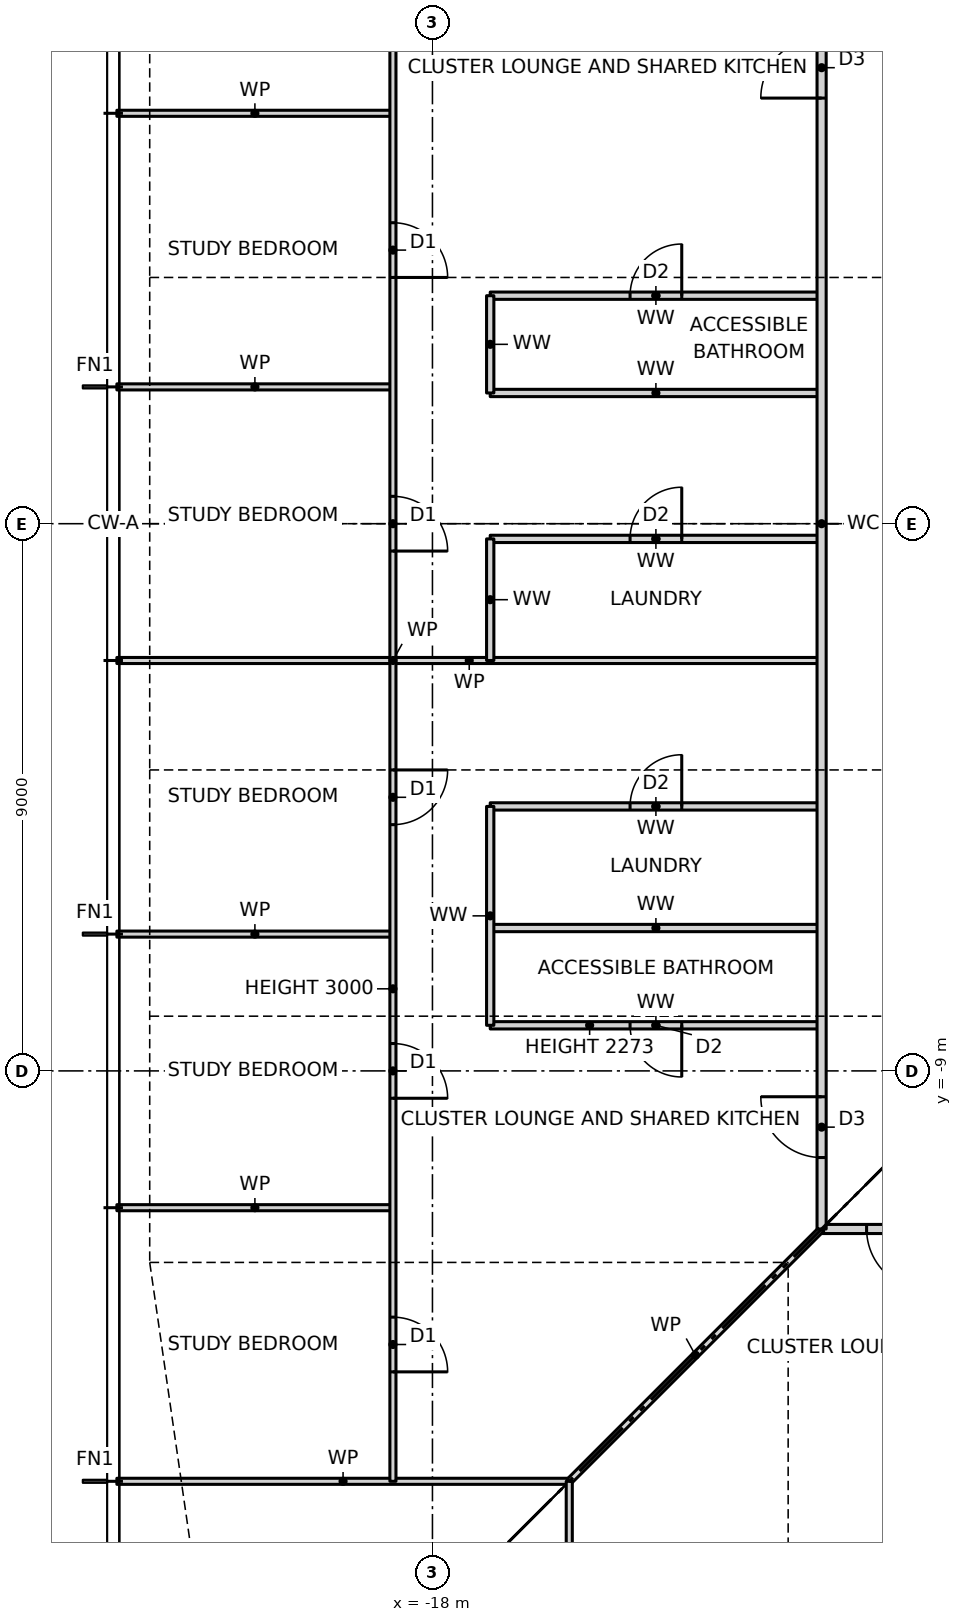
"""IFC4 building model, lengths in metres.
Left out: names, types, materials, properties, quantities, classifications, styles, units other than length and angle.
Written with IfcOpenShell. Run it as: python <this file> out.ifc"""

import sys

from ifc_helpers import new_model, si_unit, direction, frame, frame_2d, origin, place, context, subcontext, project, spatial, rectangle, extrude, element, fill, save


model = new_model("IFC4")
c1 = context("Model", 3, precision=1e-05, world=origin(), true_north=direction((0.0, 1.0)))
c2 = subcontext(c1, "Body", "Model", "MODEL_VIEW")
j1 = project(units=[si_unit("LENGTHUNIT", "METRE"), si_unit("PLANEANGLEUNIT", "RADIAN")], contexts=[c1])
p1 = place(None, origin())
s1 = spatial("IfcSite", under=j1, at=p1, CompositionType="ELEMENT")
p2 = place(p1, origin())
s2 = spatial("IfcBuilding", under=s1, at=p2, CompositionType="ELEMENT")
p3 = place(p2, frame((0.0, 0.0, 71.0)))
s3 = spatial("IfcBuildingStorey", under=s2, at=p3, CompositionType="ELEMENT", Elevation=71.0)
p4 = place(p3, frame((-23.19, -15.75, 0.0), z_axis=(0.0, 0.0, 1.0), x_axis=(1.0, 0.0, 0.0)))
e1 = element("IfcWall", 1, at=p4, inside=s3, PredefinedType="PARTITIONING", context=c2, shape_type="SweptSolid", body=[
    extrude(rectangle(XDim=7.44, YDim=0.1, at=frame_2d((3.72, 0.0))), origin(), (0.0, 0.0, 1.0), 3.2),
])
p5 = place(p3, frame((-11.6, -11.6, 0.0), z_axis=(0.0, 0.0, 1.0), x_axis=(1.0, 0.0, 0.0)))
e2 = element("IfcWall", 2, at=p5, inside=s3, PredefinedType="PARTITIONING", context=c2, shape_type="SweptSolid", body=[
    extrude(rectangle(XDim=24.2, YDim=0.15, at=frame_2d((12.1, 0.0))), origin(), (0.0, 0.0, 1.0), 3.2),
])
p6 = place(p5, frame((0.74, 0.0, 0.0)))
e3 = element("IfcOpeningElement", 3, at=p6, cuts=e2, PredefinedType="OPENING", context=c2, shape_type="SweptSolid", body=[
    extrude(rectangle(XDim=1.0, YDim=2.1, at=frame_2d((0.5, 1.05))), frame((0.0, 0.085, 0.0), z_axis=(0.0, -1.0, 0.0), x_axis=(1.0, 0.0, 0.0)), (0.0, 0.0, 1.0), 0.17),
])
p7 = place(p5, frame((21.025, 0.0, 0.0)))
e4 = element("IfcOpeningElement", 4, at=p7, cuts=e2, PredefinedType="OPENING", context=c2, shape_type="SweptSolid", body=[
    extrude(rectangle(XDim=1.0, YDim=2.1, at=frame_2d((0.5, 1.05))), frame((0.0, 0.085, 0.0), z_axis=(0.0, -1.0, 0.0), x_axis=(1.0, 0.0, 0.0)), (0.0, 0.0, 1.0), 0.17),
])
p8 = place(p3, frame((-23.19, -11.25, 0.0), z_axis=(0.0, 0.0, 1.0), x_axis=(1.0, 0.0, 0.0)))
e5 = element("IfcWall", 5, at=p8, inside=s3, PredefinedType="PARTITIONING", context=c2, shape_type="SweptSolid", body=[
    extrude(rectangle(XDim=4.54, YDim=0.1, at=frame_2d((2.27, 0.0))), origin(), (0.0, 0.0, 1.0), 3.2),
])
p9 = place(p3, frame((-17.05, -8.25, 0.0), z_axis=(0.0, 0.0, 1.0), x_axis=(1.0, 0.0, 0.0)))
e6 = element("IfcWall", 6, at=p9, inside=s3, PredefinedType="PARTITIONING", context=c2, shape_type="SweptSolid", body=[
    extrude(rectangle(XDim=5.45, YDim=0.12, at=frame_2d((2.725, 0.0))), origin(), (0.0, 0.0, 1.0), 2.273),
])
p10 = place(p9, frame((2.3, 0.0, 0.0)))
e7 = element("IfcOpeningElement", 7, at=p10, cuts=e6, PredefinedType="OPENING", context=c2, shape_type="SweptSolid", body=[
    extrude(rectangle(XDim=0.85, YDim=2.1, at=frame_2d((0.425, 1.05))), frame((0.0, 0.07, 0.0), z_axis=(0.0, -1.0, 0.0), x_axis=(1.0, 0.0, 0.0)), (0.0, 0.0, 1.0), 0.14),
])
p11 = place(p3, frame((-23.19, -6.75, 0.0), z_axis=(0.0, 0.0, 1.0), x_axis=(1.0, 0.0, 0.0)))
e8 = element("IfcWall", 8, at=p11, inside=s3, PredefinedType="PARTITIONING", context=c2, shape_type="SweptSolid", body=[
    extrude(rectangle(XDim=4.54, YDim=0.1, at=frame_2d((2.27, 0.0))), origin(), (0.0, 0.0, 1.0), 3.2),
])
p12 = place(p3, frame((-17.05, -6.65, 0.0), z_axis=(0.0, 0.0, 1.0), x_axis=(1.0, 0.0, 0.0)))
e9 = element("IfcWall", 9, at=p12, inside=s3, PredefinedType="PARTITIONING", context=c2, shape_type="SweptSolid", body=[
    extrude(rectangle(XDim=5.45, YDim=0.12, at=frame_2d((2.725, 0.0))), origin(), (0.0, 0.0, 1.0), 3.2),
])
p13 = place(p3, frame((-17.05, -4.65, 0.0), z_axis=(0.0, 0.0, 1.0), x_axis=(1.0, 0.0, 0.0)))
e10 = element("IfcWall", 10, at=p13, inside=s3, PredefinedType="PARTITIONING", context=c2, shape_type="SweptSolid", body=[
    extrude(rectangle(XDim=5.45, YDim=0.12, at=frame_2d((2.725, 0.0))), origin(), (0.0, 0.0, 1.0), 3.2),
])
p14 = place(p13, frame((2.3, 0.0, 0.0)))
e11 = element("IfcOpeningElement", 11, at=p14, cuts=e10, PredefinedType="OPENING", context=c2, shape_type="SweptSolid", body=[
    extrude(rectangle(XDim=0.85, YDim=2.1, at=frame_2d((0.425, 1.05))), frame((0.0, 0.07, 0.0), z_axis=(0.0, -1.0, 0.0), x_axis=(1.0, 0.0, 0.0)), (0.0, 0.0, 1.0), 0.14),
])
p15 = place(p3, frame((-23.19, -2.25, 0.0), z_axis=(0.0, 0.0, 1.0), x_axis=(1.0, 0.0, 0.0)))
e12 = element("IfcWall", 12, at=p15, inside=s3, PredefinedType="PARTITIONING", context=c2, shape_type="SweptSolid", body=[
    extrude(rectangle(XDim=11.59, YDim=0.1, at=frame_2d((5.795, 0.0))), origin(), (0.0, 0.0, 1.0), 3.2),
])
p16 = place(p3, frame((-17.05, -0.25, 0.0), z_axis=(0.0, 0.0, 1.0), x_axis=(1.0, 0.0, 0.0)))
e13 = element("IfcWall", 13, at=p16, inside=s3, PredefinedType="PARTITIONING", context=c2, shape_type="SweptSolid", body=[
    extrude(rectangle(XDim=5.45, YDim=0.12, at=frame_2d((2.725, 0.0))), origin(), (0.0, 0.0, 1.0), 3.2),
])
p17 = place(p16, frame((2.3, 0.0, 0.0)))
e14 = element("IfcOpeningElement", 14, at=p17, cuts=e13, PredefinedType="OPENING", context=c2, shape_type="SweptSolid", body=[
    extrude(rectangle(XDim=0.85, YDim=2.1, at=frame_2d((0.425, 1.05))), frame((0.0, 0.07, 0.0), z_axis=(0.0, -1.0, 0.0), x_axis=(1.0, 0.0, 0.0)), (0.0, 0.0, 1.0), 0.14),
])
p18 = place(p3, frame((-17.05, 2.15, 0.0), z_axis=(0.0, 0.0, 1.0), x_axis=(1.0, 0.0, 0.0)))
e15 = element("IfcWall", 15, at=p18, inside=s3, PredefinedType="PARTITIONING", context=c2, shape_type="SweptSolid", body=[
    extrude(rectangle(XDim=5.45, YDim=0.12, at=frame_2d((2.725, 0.0))), origin(), (0.0, 0.0, 1.0), 3.2),
])
p19 = place(p3, frame((-23.19, 2.25, 0.0), z_axis=(0.0, 0.0, 1.0), x_axis=(1.0, 0.0, 0.0)))
e16 = element("IfcWall", 16, at=p19, inside=s3, PredefinedType="PARTITIONING", context=c2, shape_type="SweptSolid", body=[
    extrude(rectangle(XDim=4.54, YDim=0.1, at=frame_2d((2.27, 0.0))), origin(), (0.0, 0.0, 1.0), 3.2),
])
p20 = place(p3, frame((-17.05, 3.75, 0.0), z_axis=(0.0, 0.0, 1.0), x_axis=(1.0, 0.0, 0.0)))
e17 = element("IfcWall", 17, at=p20, inside=s3, PredefinedType="PARTITIONING", context=c2, shape_type="SweptSolid", body=[
    extrude(rectangle(XDim=5.45, YDim=0.12, at=frame_2d((2.725, 0.0))), origin(), (0.0, 0.0, 1.0), 3.2),
])
p21 = place(p20, frame((2.3, 0.0, 0.0)))
e18 = element("IfcOpeningElement", 18, at=p21, cuts=e17, PredefinedType="OPENING", context=c2, shape_type="SweptSolid", body=[
    extrude(rectangle(XDim=0.85, YDim=2.1, at=frame_2d((0.425, 1.05))), frame((0.0, 0.07, 0.0), z_axis=(0.0, -1.0, 0.0), x_axis=(1.0, 0.0, 0.0)), (0.0, 0.0, 1.0), 0.14),
])
p22 = place(p3, frame((-23.19, 6.75, 0.0), z_axis=(0.0, 0.0, 1.0), x_axis=(1.0, 0.0, 0.0)))
e19 = element("IfcWall", 19, at=p22, inside=s3, PredefinedType="PARTITIONING", context=c2, shape_type="SweptSolid", body=[
    extrude(rectangle(XDim=4.54, YDim=0.1, at=frame_2d((2.27, 0.0))), origin(), (0.0, 0.0, 1.0), 3.2),
])
p23 = place(p3, frame((-15.75, -15.75, 0.0), z_axis=(0.0, 0.0, 1.0), x_axis=(0.707106781187, 0.707106781187, 0.0)))
e20 = element("IfcWall", 20, at=p23, inside=s3, PredefinedType="PARTITIONING", context=c2, shape_type="SweptSolid", body=[
    extrude(rectangle(XDim=5.869, YDim=0.1, at=frame_2d((2.935, 0.0))), origin(), (0.0, 0.0, 1.0), 3.2),
])
p24 = place(p3, frame((-11.6, -11.6, 0.0), z_axis=(0.0, 0.0, 1.0), x_axis=(0.0, 1.0, 0.0)))
e21 = element("IfcWall", 21, at=p24, inside=s3, PredefinedType="PARTITIONING", context=c2, shape_type="SweptSolid", body=[
    extrude(rectangle(XDim=23.2, YDim=0.15, at=frame_2d((11.6, 0.0))), origin(), (0.0, 0.0, 1.0), 3.2),
])
p25 = place(p24, frame((18.6, 0.0, 0.0)))
e22 = element("IfcOpeningElement", 22, at=p25, cuts=e21, PredefinedType="OPENING", context=c2, shape_type="SweptSolid", body=[
    extrude(rectangle(XDim=1.0, YDim=2.1, at=frame_2d((0.5, 1.05))), frame((0.0, 0.085, 0.0), z_axis=(0.0, -1.0, 0.0), x_axis=(1.0, 0.0, 0.0)), (0.0, 0.0, 1.0), 0.17),
])
p26 = place(p24, frame((1.175, 0.0, 0.0)))
e23 = element("IfcOpeningElement", 23, at=p26, cuts=e21, PredefinedType="OPENING", context=c2, shape_type="SweptSolid", body=[
    extrude(rectangle(XDim=1.0, YDim=2.1, at=frame_2d((0.5, 1.05))), frame((0.0, 0.085, 0.0), z_axis=(0.0, -1.0, 0.0), x_axis=(1.0, 0.0, 0.0)), (0.0, 0.0, 1.0), 0.17),
])
p27 = place(p3, frame((-15.75, -23.19, 0.0), z_axis=(0.0, 0.0, 1.0), x_axis=(0.0, 1.0, 0.0)))
e24 = element("IfcWall", 24, at=p27, inside=s3, PredefinedType="PARTITIONING", context=c2, shape_type="SweptSolid", body=[
    extrude(rectangle(XDim=7.44, YDim=0.1, at=frame_2d((3.72, 0.0))), origin(), (0.0, 0.0, 1.0), 3.2),
])
p28 = place(p27, frame((4.915, 0.0, 0.0)))
e25 = element("IfcOpeningElement", 25, at=p28, cuts=e24, PredefinedType="OPENING", context=c2, shape_type="SweptSolid", body=[
    extrude(rectangle(XDim=0.85, YDim=2.1, at=frame_2d((0.425, 1.05))), frame((0.0, 0.06, 0.0), z_axis=(0.0, -1.0, 0.0), x_axis=(1.0, 0.0, 0.0)), (0.0, 0.0, 1.0), 0.12),
])
p29 = place(p3, frame((-17.05, -8.25, 0.0), z_axis=(0.0, 0.0, 1.0), x_axis=(0.0, 1.0, 0.0)))
e26 = element("IfcWall", 26, at=p29, inside=s3, PredefinedType="PARTITIONING", context=c2, shape_type="SweptSolid", body=[
    extrude(rectangle(XDim=3.6, YDim=0.12, at=frame_2d((1.8, 0.0))), origin(), (0.0, 0.0, 1.0), 3.2),
])
p30 = place(p3, frame((-17.05, -2.25, 0.0), z_axis=(0.0, 0.0, 1.0), x_axis=(0.0, 1.0, 0.0)))
e27 = element("IfcWall", 27, at=p30, inside=s3, PredefinedType="PARTITIONING", context=c2, shape_type="SweptSolid", body=[
    extrude(rectangle(XDim=2.0, YDim=0.12, at=frame_2d((1.0, 0.0))), origin(), (0.0, 0.0, 1.0), 3.2),
])
p31 = place(p3, frame((-17.05, 2.15, 0.0), z_axis=(0.0, 0.0, 1.0), x_axis=(0.0, 1.0, 0.0)))
e28 = element("IfcWall", 28, at=p31, inside=s3, PredefinedType="PARTITIONING", context=c2, shape_type="SweptSolid", body=[
    extrude(rectangle(XDim=1.6, YDim=0.12, at=frame_2d((0.8, 0.0))), origin(), (0.0, 0.0, 1.0), 3.2),
])
p32 = place(p3, frame((-18.65, -15.75, 0.0), z_axis=(0.0, 0.0, 1.0), x_axis=(0.0, 1.0, 0.0)))
e29 = element("IfcWall", 29, at=p32, inside=s3, PredefinedType="PARTITIONING", context=c2, shape_type="SweptSolid", body=[
    extrude(rectangle(XDim=27.0, YDim=0.1, at=frame_2d((13.5, 0.0))), origin(), (0.0, 0.0, 1.0), 3.0),
])
p33 = place(p32, frame((24.3, 0.0, 0.0)))
e30 = element("IfcOpeningElement", 30, at=p33, cuts=e29, PredefinedType="OPENING", context=c2, shape_type="SweptSolid", body=[
    extrude(rectangle(XDim=0.9, YDim=2.1, at=frame_2d((0.45, 1.05))), frame((0.0, 0.06, 0.0), z_axis=(0.0, -1.0, 0.0), x_axis=(1.0, 0.0, 0.0)), (0.0, 0.0, 1.0), 0.12),
])
p34 = place(p32, frame((19.8, 0.0, 0.0)))
e31 = element("IfcOpeningElement", 31, at=p34, cuts=e29, PredefinedType="OPENING", context=c2, shape_type="SweptSolid", body=[
    extrude(rectangle(XDim=0.9, YDim=2.1, at=frame_2d((0.45, 1.05))), frame((0.0, 0.06, 0.0), z_axis=(0.0, -1.0, 0.0), x_axis=(1.0, 0.0, 0.0)), (0.0, 0.0, 1.0), 0.12),
])
p35 = place(p32, frame((15.3, 0.0, 0.0)))
e32 = element("IfcOpeningElement", 32, at=p35, cuts=e29, PredefinedType="OPENING", context=c2, shape_type="SweptSolid", body=[
    extrude(rectangle(XDim=0.9, YDim=2.1, at=frame_2d((0.45, 1.05))), frame((0.0, 0.06, 0.0), z_axis=(0.0, -1.0, 0.0), x_axis=(1.0, 0.0, 0.0)), (0.0, 0.0, 1.0), 0.12),
])
p36 = place(p32, frame((10.8, 0.0, 0.0)))
e33 = element("IfcOpeningElement", 33, at=p36, cuts=e29, PredefinedType="OPENING", context=c2, shape_type="SweptSolid", body=[
    extrude(rectangle(XDim=0.9, YDim=2.1, at=frame_2d((0.45, 1.05))), frame((0.0, 0.06, 0.0), z_axis=(0.0, -1.0, 0.0), x_axis=(1.0, 0.0, 0.0)), (0.0, 0.0, 1.0), 0.12),
])
p37 = place(p32, frame((6.3, 0.0, 0.0)))
e34 = element("IfcOpeningElement", 34, at=p37, cuts=e29, PredefinedType="OPENING", context=c2, shape_type="SweptSolid", body=[
    extrude(rectangle(XDim=0.9, YDim=2.1, at=frame_2d((0.45, 1.05))), frame((0.0, 0.06, 0.0), z_axis=(0.0, -1.0, 0.0), x_axis=(1.0, 0.0, 0.0)), (0.0, 0.0, 1.0), 0.12),
])
p38 = place(p32, frame((1.8, 0.0, 0.0)))
e35 = element("IfcOpeningElement", 35, at=p38, cuts=e29, PredefinedType="OPENING", context=c2, shape_type="SweptSolid", body=[
    extrude(rectangle(XDim=0.9, YDim=2.1, at=frame_2d((0.45, 1.05))), frame((0.0, 0.06, 0.0), z_axis=(0.0, -1.0, 0.0), x_axis=(1.0, 0.0, 0.0)), (0.0, 0.0, 1.0), 0.12),
])
p39 = place(p6, frame((1.0, 0.0, 0.0), z_axis=(0.0, 0.0, 1.0), x_axis=(-1.0, 0.0, 0.0)))
e36 = element("IfcDoor", 36, at=p39, inside=s3, OperationType="SINGLE_SWING_LEFT", PredefinedType="DOOR", context=c2, shape_type="SweptSolid", body=[
    extrude(rectangle(XDim=1.0, YDim=2.1, at=frame_2d((0.5, 1.05))), frame((0.0, 0.025, 0.0), z_axis=(0.0, -1.0, 0.0), x_axis=(1.0, 0.0, 0.0)), (0.0, 0.0, 1.0), 0.05),
])
fill(e3, e36)
p40 = place(p34, frame((0.9, 0.0, 0.0), z_axis=(0.0, 0.0, 1.0), x_axis=(-1.0, 0.0, 0.0)))
e37 = element("IfcDoor", 37, at=p40, inside=s3, OperationType="SINGLE_SWING_RIGHT", PredefinedType="DOOR", context=c2, shape_type="SweptSolid", body=[
    extrude(rectangle(XDim=0.9, YDim=2.1, at=frame_2d((0.45, 1.05))), frame((0.0, 0.025, 0.0), z_axis=(0.0, -1.0, 0.0), x_axis=(1.0, 0.0, 0.0)), (0.0, 0.0, 1.0), 0.05),
])
fill(e31, e37)
p41 = place(p35, frame((0.9, 0.0, 0.0), z_axis=(0.0, 0.0, 1.0), x_axis=(-1.0, 0.0, 0.0)))
e38 = element("IfcDoor", 38, at=p41, inside=s3, OperationType="SINGLE_SWING_RIGHT", PredefinedType="DOOR", context=c2, shape_type="SweptSolid", body=[
    extrude(rectangle(XDim=0.9, YDim=2.1, at=frame_2d((0.45, 1.05))), frame((0.0, 0.025, 0.0), z_axis=(0.0, -1.0, 0.0), x_axis=(1.0, 0.0, 0.0)), (0.0, 0.0, 1.0), 0.05),
])
fill(e32, e38)
p42 = place(p25, origin())
e39 = element("IfcDoor", 39, at=p42, inside=s3, OperationType="SINGLE_SWING_LEFT", PredefinedType="DOOR", context=c2, shape_type="SweptSolid", body=[
    extrude(rectangle(XDim=1.0, YDim=2.1, at=frame_2d((0.5, 1.05))), frame((0.0, 0.025, 0.0), z_axis=(0.0, -1.0, 0.0), x_axis=(1.0, 0.0, 0.0)), (0.0, 0.0, 1.0), 0.05),
])
fill(e22, e39)
p43 = place(p21, origin())
e40 = element("IfcDoor", 40, at=p43, inside=s3, OperationType="SINGLE_SWING_RIGHT", PredefinedType="DOOR", context=c2, shape_type="SweptSolid", body=[
    extrude(rectangle(XDim=0.85, YDim=2.1, at=frame_2d((0.425, 1.05))), frame((0.0, 0.025, 0.0), z_axis=(0.0, -1.0, 0.0), x_axis=(1.0, 0.0, 0.0)), (0.0, 0.0, 1.0), 0.05),
])
fill(e18, e40)
p44 = place(p17, origin())
e41 = element("IfcDoor", 41, at=p44, inside=s3, OperationType="SINGLE_SWING_RIGHT", PredefinedType="DOOR", context=c2, shape_type="SweptSolid", body=[
    extrude(rectangle(XDim=0.85, YDim=2.1, at=frame_2d((0.425, 1.05))), frame((0.0, 0.025, 0.0), z_axis=(0.0, -1.0, 0.0), x_axis=(1.0, 0.0, 0.0)), (0.0, 0.0, 1.0), 0.05),
])
fill(e14, e41)
p45 = place(p36, frame((0.9, 0.0, 0.0), z_axis=(0.0, 0.0, 1.0), x_axis=(-1.0, 0.0, 0.0)))
e42 = element("IfcDoor", 42, at=p45, inside=s3, OperationType="SINGLE_SWING_LEFT", PredefinedType="DOOR", context=c2, shape_type="SweptSolid", body=[
    extrude(rectangle(XDim=0.9, YDim=2.1, at=frame_2d((0.45, 1.05))), frame((0.0, 0.025, 0.0), z_axis=(0.0, -1.0, 0.0), x_axis=(1.0, 0.0, 0.0)), (0.0, 0.0, 1.0), 0.05),
])
fill(e33, e42)
p46 = place(p37, frame((0.9, 0.0, 0.0), z_axis=(0.0, 0.0, 1.0), x_axis=(-1.0, 0.0, 0.0)))
e43 = element("IfcDoor", 43, at=p46, inside=s3, OperationType="SINGLE_SWING_RIGHT", PredefinedType="DOOR", context=c2, shape_type="SweptSolid", body=[
    extrude(rectangle(XDim=0.9, YDim=2.1, at=frame_2d((0.45, 1.05))), frame((0.0, 0.025, 0.0), z_axis=(0.0, -1.0, 0.0), x_axis=(1.0, 0.0, 0.0)), (0.0, 0.0, 1.0), 0.05),
])
fill(e34, e43)
p47 = place(p38, frame((0.9, 0.0, 0.0), z_axis=(0.0, 0.0, 1.0), x_axis=(-1.0, 0.0, 0.0)))
e44 = element("IfcDoor", 44, at=p47, inside=s3, OperationType="SINGLE_SWING_RIGHT", PredefinedType="DOOR", context=c2, shape_type="SweptSolid", body=[
    extrude(rectangle(XDim=0.9, YDim=2.1, at=frame_2d((0.45, 1.05))), frame((0.0, 0.025, 0.0), z_axis=(0.0, -1.0, 0.0), x_axis=(1.0, 0.0, 0.0)), (0.0, 0.0, 1.0), 0.05),
])
fill(e35, e44)
p48 = place(p26, origin())
e45 = element("IfcDoor", 45, at=p48, inside=s3, OperationType="SINGLE_SWING_RIGHT", PredefinedType="DOOR", context=c2, shape_type="SweptSolid", body=[
    extrude(rectangle(XDim=1.0, YDim=2.1, at=frame_2d((0.5, 1.05))), frame((0.0, 0.025, 0.0), z_axis=(0.0, -1.0, 0.0), x_axis=(1.0, 0.0, 0.0)), (0.0, 0.0, 1.0), 0.05),
])
fill(e23, e45)
p49 = place(p14, origin())
e46 = element("IfcDoor", 46, at=p49, inside=s3, OperationType="SINGLE_SWING_RIGHT", PredefinedType="DOOR", context=c2, shape_type="SweptSolid", body=[
    extrude(rectangle(XDim=0.85, YDim=2.1, at=frame_2d((0.425, 1.05))), frame((0.0, 0.025, 0.0), z_axis=(0.0, -1.0, 0.0), x_axis=(1.0, 0.0, 0.0)), (0.0, 0.0, 1.0), 0.05),
])
fill(e11, e46)
p50 = place(p10, frame((0.85, 0.0, 0.0), z_axis=(0.0, 0.0, 1.0), x_axis=(-1.0, 0.0, 0.0)))
e47 = element("IfcDoor", 47, at=p50, inside=s3, OperationType="SINGLE_SWING_LEFT", PredefinedType="DOOR", context=c2, shape_type="SweptSolid", body=[
    extrude(rectangle(XDim=0.85, YDim=2.1, at=frame_2d((0.425, 1.05))), frame((0.0, 0.025, 0.0), z_axis=(0.0, -1.0, 0.0), x_axis=(1.0, 0.0, 0.0)), (0.0, 0.0, 1.0), 0.05),
])
fill(e7, e47)
save(model, sys.argv[1])
